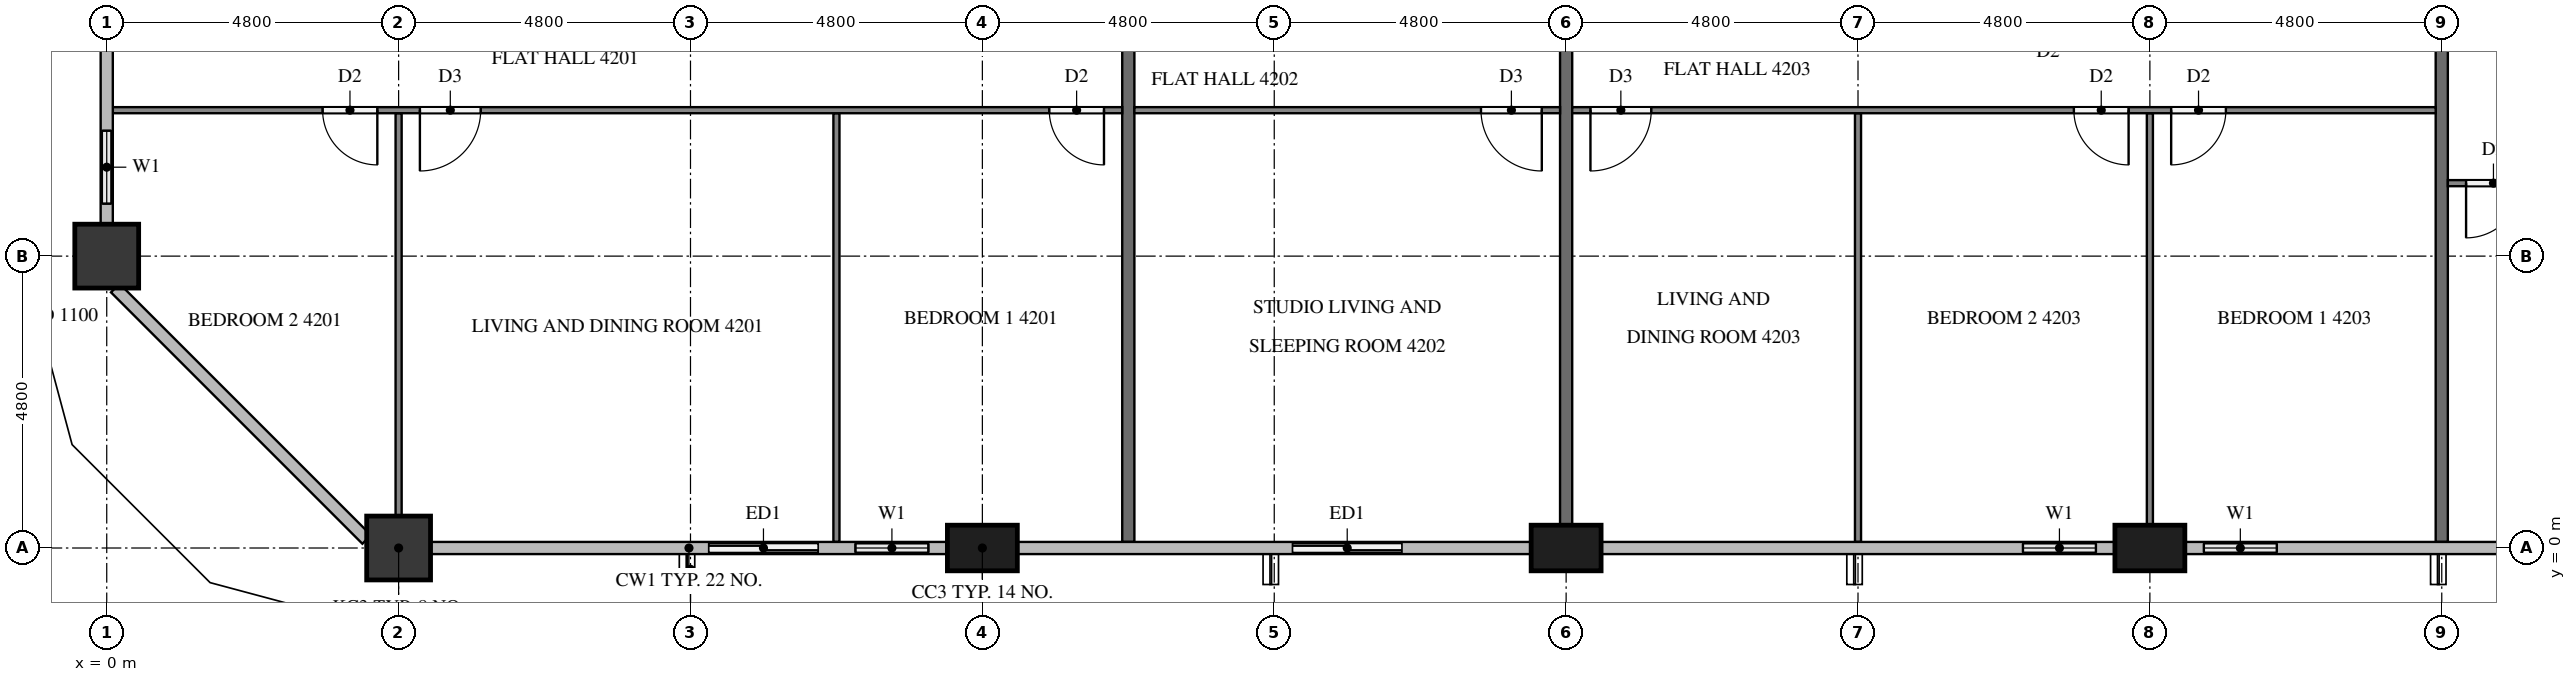
"""IFC4 building model, lengths in metres.
Left out: names, types, materials, properties, quantities, classifications, styles, units other than length and angle.
Written with IfcOpenShell. Run it as: python <this file> out.ifc"""

import sys

from ifc_helpers import new_model, si_unit, direction, frame, frame_2d, origin, origin_2d, place, context, subcontext, project, spatial, rectangle, extrude, element, fill, save


model = new_model("IFC4")
c1 = context("Model", 3, precision=1e-05, world=origin(), true_north=direction((0.0, 1.0)))
c2 = subcontext(c1, "Body", "Model", "MODEL_VIEW")
j1 = project(units=[si_unit("LENGTHUNIT", "METRE"), si_unit("PLANEANGLEUNIT", "RADIAN")], contexts=[c1])
p1 = place(None, origin())
s1 = spatial("IfcSite", under=j1, at=p1, CompositionType="ELEMENT")
p2 = place(p1, origin())
s2 = spatial("IfcBuilding", under=s1, at=p2, CompositionType="ELEMENT")
p3 = place(p2, frame((0.0, 0.0, 163.0)))
s3 = spatial("IfcBuildingStorey", under=s2, at=p3, CompositionType="ELEMENT", Elevation=163.0)
p4 = place(p3, frame((4.8, 0.0, 0.0), z_axis=(0.0, 0.0, 1.0), x_axis=(1.0, 0.0, 0.0)))
e1 = element("IfcColumn", 1, at=p4, inside=s3, PredefinedType="COLUMN", context=c2, shape_type="SweptSolid", body=[
    extrude(rectangle(XDim=1.05, YDim=1.05, at=origin_2d()), origin(), (0.0, 0.0, 1.0), 3.2),
])
for number, where, z_axis, x_axis in (
    (2, (14.4, 0.0, 0.0), (0.0, 0.0, 1.0), (1.0, 0.0, 0.0)),
    (3, (24.0, 0.0, 0.0), (0.0, 0.0, 1.0), (1.0, 0.0, 0.0)),
    (4, (33.6, 0.0, 0.0), (0.0, 0.0, 1.0), (1.0, 0.0, 0.0)),
):
    element("IfcColumn", number, at=place(p3, frame(where, z_axis=z_axis, x_axis=x_axis)), inside=s3, PredefinedType="COLUMN", context=c2, shape_type="SweptSolid", body=[
        extrude(rectangle(XDim=1.15, YDim=0.75, at=origin_2d()), origin(), (0.0, 0.0, 1.0), 3.2),
    ])
p5 = place(p3, frame((0.0, 4.8, 0.0), z_axis=(0.0, 0.0, 1.0), x_axis=(1.0, 0.0, 0.0)))
e5 = element("IfcColumn", 5, at=p5, inside=s3, PredefinedType="COLUMN", context=c2, shape_type="SweptSolid", body=[
    extrude(rectangle(XDim=1.05, YDim=1.05, at=origin_2d()), origin(), (0.0, 0.0, 1.0), 3.2),
])
p6 = place(p3, frame((9.6, 0.0, 0.0), z_axis=(0.0, 0.0, 1.0), x_axis=(1.0, 0.0, 0.0)))
e6 = element("IfcWall", 6, at=p6, inside=s3, PredefinedType="SOLIDWALL", context=c2, shape_type="SweptSolid", body=[
    extrude(rectangle(XDim=4.225, YDim=0.15, at=frame_2d((2.112, 0.0))), origin(), (0.0, 0.0, 1.0), 3.2),
])
p7 = place(p6, frame((0.3, 0.0, 0.0)))
e7 = element("IfcOpeningElement", 7, at=p7, cuts=e6, PredefinedType="OPENING", context=c2, shape_type="SweptSolid", body=[
    extrude(rectangle(XDim=1.8, YDim=2.4, at=frame_2d((0.9, 1.2))), frame((0.0, 0.085, 0.0), z_axis=(0.0, -1.0, 0.0), x_axis=(1.0, 0.0, 0.0)), (0.0, 0.0, 1.0), 0.17),
])
p8 = place(p6, frame((2.712, 0.0, 0.9)))
e8 = element("IfcOpeningElement", 8, at=p8, cuts=e6, PredefinedType="OPENING", context=c2, shape_type="SweptSolid", body=[
    extrude(rectangle(XDim=1.2, YDim=1.4, at=frame_2d((0.6, 0.7))), frame((0.0, 0.085, 0.0), z_axis=(0.0, -1.0, 0.0), x_axis=(1.0, 0.0, 0.0)), (0.0, 0.0, 1.0), 0.17),
])
p9 = place(p3, frame((19.2, 0.0, 0.0), z_axis=(0.0, 0.0, 1.0), x_axis=(1.0, 0.0, 0.0)))
e9 = element("IfcWall", 9, at=p9, inside=s3, PredefinedType="SOLIDWALL", context=c2, shape_type="SweptSolid", body=[
    extrude(rectangle(XDim=2.4, YDim=0.15, at=frame_2d((1.2, 0.0))), origin(), (0.0, 0.0, 1.0), 3.2),
])
p10 = place(p9, frame((0.3, 0.0, 0.0)))
e10 = element("IfcOpeningElement", 10, at=p10, cuts=e9, PredefinedType="OPENING", context=c2, shape_type="SweptSolid", body=[
    extrude(rectangle(XDim=1.8, YDim=2.4, at=frame_2d((0.9, 1.2))), frame((0.0, 0.085, 0.0), z_axis=(0.0, -1.0, 0.0), x_axis=(1.0, 0.0, 0.0)), (0.0, 0.0, 1.0), 0.17),
])
p11 = place(p3, frame((31.2, 0.0, 0.0), z_axis=(0.0, 0.0, 1.0), x_axis=(1.0, 0.0, 0.0)))
e11 = element("IfcWall", 11, at=p11, inside=s3, PredefinedType="SOLIDWALL", context=c2, shape_type="SweptSolid", body=[
    extrude(rectangle(XDim=1.825, YDim=0.15, at=frame_2d((0.913, 0.0))), origin(), (0.0, 0.0, 1.0), 3.2),
])
p12 = place(p11, frame((0.312, 0.0, 0.9)))
e12 = element("IfcOpeningElement", 12, at=p12, cuts=e11, PredefinedType="OPENING", context=c2, shape_type="SweptSolid", body=[
    extrude(rectangle(XDim=1.2, YDim=1.4, at=frame_2d((0.6, 0.7))), frame((0.0, 0.085, 0.0), z_axis=(0.0, -1.0, 0.0), x_axis=(1.0, 0.0, 0.0)), (0.0, 0.0, 1.0), 0.17),
])
p13 = place(p3, frame((34.175, 0.0, 0.0), z_axis=(0.0, 0.0, 1.0), x_axis=(1.0, 0.0, 0.0)))
e13 = element("IfcWall", 13, at=p13, inside=s3, PredefinedType="SOLIDWALL", context=c2, shape_type="SweptSolid", body=[
    extrude(rectangle(XDim=1.825, YDim=0.15, at=frame_2d((0.913, 0.0))), origin(), (0.0, 0.0, 1.0), 3.2),
])
p14 = place(p13, frame((0.312, 0.0, 0.9)))
e14 = element("IfcOpeningElement", 14, at=p14, cuts=e13, PredefinedType="OPENING", context=c2, shape_type="SweptSolid", body=[
    extrude(rectangle(XDim=1.2, YDim=1.4, at=frame_2d((0.6, 0.7))), frame((0.0, 0.085, 0.0), z_axis=(0.0, -1.0, 0.0), x_axis=(1.0, 0.0, 0.0)), (0.0, 0.0, 1.0), 0.17),
])
p15 = place(p3, frame((0.0, 7.2, 0.0), z_axis=(0.0, 0.0, 1.0), x_axis=(0.0, -1.0, 0.0)))
e15 = element("IfcWall", 15, at=p15, inside=s3, PredefinedType="SOLIDWALL", context=c2, shape_type="SweptSolid", body=[
    extrude(rectangle(XDim=1.875, YDim=0.15, at=frame_2d((0.938, 0.0))), origin(), (0.0, 0.0, 1.0), 3.2),
])
p16 = place(p15, frame((0.337, 0.0, 0.9)))
e16 = element("IfcOpeningElement", 16, at=p16, cuts=e15, PredefinedType="OPENING", context=c2, shape_type="SweptSolid", body=[
    extrude(rectangle(XDim=1.2, YDim=1.4, at=frame_2d((0.6, 0.7))), frame((0.0, 0.085, 0.0), z_axis=(0.0, -1.0, 0.0), x_axis=(1.0, 0.0, 0.0)), (0.0, 0.0, 1.0), 0.17),
])
p17 = place(p3, frame((16.8, 11.9, 0.0), z_axis=(0.0, 0.0, 1.0), x_axis=(0.0, -1.0, 0.0)))
e17 = element("IfcWall", 17, at=p17, inside=s3, PredefinedType="PARTITIONING", context=c2, shape_type="SweptSolid", body=[
    extrude(rectangle(XDim=11.8, YDim=0.2, at=frame_2d((5.9, 0.0))), origin(), (0.0, 0.0, 1.0), 3.2),
])
p18 = place(p3, frame((24.0, 11.9, 0.0), z_axis=(0.0, 0.0, 1.0), x_axis=(0.0, -1.0, 0.0)))
e18 = element("IfcWall", 18, at=p18, inside=s3, PredefinedType="PARTITIONING", context=c2, shape_type="SweptSolid", body=[
    extrude(rectangle(XDim=11.525, YDim=0.2, at=frame_2d((5.762, 0.0))), origin(), (0.0, 0.0, 1.0), 3.2),
])
p19 = place(p3, frame((38.4, 11.9, 0.0), z_axis=(0.0, 0.0, 1.0), x_axis=(0.0, -1.0, 0.0)))
e19 = element("IfcWall", 19, at=p19, inside=s3, PredefinedType="PARTITIONING", context=c2, shape_type="SweptSolid", body=[
    extrude(rectangle(XDim=11.8, YDim=0.2, at=frame_2d((5.9, 0.0))), origin(), (0.0, 0.0, 1.0), 3.2),
])
p20 = place(p3, frame((12.0, 7.15, 0.0), z_axis=(0.0, 0.0, 1.0), x_axis=(0.0, -1.0, 0.0)))
e20 = element("IfcWall", 20, at=p20, inside=s3, PredefinedType="PARTITIONING", context=c2, shape_type="SweptSolid", body=[
    extrude(rectangle(XDim=7.05, YDim=0.1, at=frame_2d((3.525, 0.0))), origin(), (0.0, 0.0, 1.0), 3.2),
])
p21 = place(p3, frame((4.8, 7.15, 0.0), z_axis=(0.0, 0.0, 1.0), x_axis=(0.0, -1.0, 0.0)))
e21 = element("IfcWall", 21, at=p21, inside=s3, PredefinedType="PARTITIONING", context=c2, shape_type="SweptSolid", body=[
    extrude(rectangle(XDim=6.625, YDim=0.1, at=frame_2d((3.312, 0.0))), origin(), (0.0, 0.0, 1.0), 3.2),
])
p22 = place(p3, frame((16.7, 7.2, 0.0), z_axis=(0.0, 0.0, 1.0), x_axis=(-1.0, 0.0, 0.0)))
e22 = element("IfcWall", 22, at=p22, inside=s3, PredefinedType="PARTITIONING", context=c2, shape_type="SweptSolid", body=[
    extrude(rectangle(XDim=16.6, YDim=0.1, at=frame_2d((8.3, 0.0))), origin(), (0.0, 0.0, 1.0), 3.2),
])
p23 = place(p22, frame((0.3, 0.0, 0.0)))
e23 = element("IfcOpeningElement", 23, at=p23, cuts=e22, PredefinedType="OPENING", context=c2, shape_type="SweptSolid", body=[
    extrude(rectangle(XDim=0.9, YDim=2.1, at=frame_2d((0.45, 1.05))), frame((0.0, 0.06, 0.0), z_axis=(0.0, -1.0, 0.0), x_axis=(1.0, 0.0, 0.0)), (0.0, 0.0, 1.0), 0.12),
])
p24 = place(p22, frame((10.55, 0.0, 0.0)))
e24 = element("IfcOpeningElement", 24, at=p24, cuts=e22, PredefinedType="OPENING", context=c2, shape_type="SweptSolid", body=[
    extrude(rectangle(XDim=1.0, YDim=2.1, at=frame_2d((0.5, 1.05))), frame((0.0, 0.06, 0.0), z_axis=(0.0, -1.0, 0.0), x_axis=(1.0, 0.0, 0.0)), (0.0, 0.0, 1.0), 0.12),
])
p25 = place(p22, frame((12.25, 0.0, 0.0)))
e25 = element("IfcOpeningElement", 25, at=p25, cuts=e22, PredefinedType="OPENING", context=c2, shape_type="SweptSolid", body=[
    extrude(rectangle(XDim=0.9, YDim=2.1, at=frame_2d((0.45, 1.05))), frame((0.0, 0.06, 0.0), z_axis=(0.0, -1.0, 0.0), x_axis=(1.0, 0.0, 0.0)), (0.0, 0.0, 1.0), 0.12),
])
p26 = place(p3, frame((23.9, 7.2, 0.0), z_axis=(0.0, 0.0, 1.0), x_axis=(-1.0, 0.0, 0.0)))
e26 = element("IfcWall", 26, at=p26, inside=s3, PredefinedType="PARTITIONING", context=c2, shape_type="SweptSolid", body=[
    extrude(rectangle(XDim=7.0, YDim=0.1, at=frame_2d((3.5, 0.0))), origin(), (0.0, 0.0, 1.0), 3.2),
])
p27 = place(p26, frame((0.3, 0.0, 0.0)))
e27 = element("IfcOpeningElement", 27, at=p27, cuts=e26, PredefinedType="OPENING", context=c2, shape_type="SweptSolid", body=[
    extrude(rectangle(XDim=1.0, YDim=2.1, at=frame_2d((0.5, 1.05))), frame((0.0, 0.06, 0.0), z_axis=(0.0, -1.0, 0.0), x_axis=(1.0, 0.0, 0.0)), (0.0, 0.0, 1.0), 0.12),
])
p28 = place(p3, frame((33.6, 7.15, 0.0), z_axis=(0.0, 0.0, 1.0), x_axis=(0.0, -1.0, 0.0)))
e28 = element("IfcWall", 28, at=p28, inside=s3, PredefinedType="PARTITIONING", context=c2, shape_type="SweptSolid", body=[
    extrude(rectangle(XDim=6.775, YDim=0.1, at=frame_2d((3.387, 0.0))), origin(), (0.0, 0.0, 1.0), 3.2),
])
p29 = place(p3, frame((28.8, 7.15, 0.0), z_axis=(0.0, 0.0, 1.0), x_axis=(0.0, -1.0, 0.0)))
e29 = element("IfcWall", 29, at=p29, inside=s3, PredefinedType="PARTITIONING", context=c2, shape_type="SweptSolid", body=[
    extrude(rectangle(XDim=7.05, YDim=0.1, at=frame_2d((3.525, 0.0))), origin(), (0.0, 0.0, 1.0), 3.2),
])
p30 = place(p3, frame((38.3, 7.2, 0.0), z_axis=(0.0, 0.0, 1.0), x_axis=(-1.0, 0.0, 0.0)))
e30 = element("IfcWall", 30, at=p30, inside=s3, PredefinedType="PARTITIONING", context=c2, shape_type="SweptSolid", body=[
    extrude(rectangle(XDim=14.2, YDim=0.1, at=frame_2d((7.1, 0.0))), origin(), (0.0, 0.0, 1.0), 3.2),
])
p31 = place(p30, frame((3.45, 0.0, 0.0)))
e31 = element("IfcOpeningElement", 31, at=p31, cuts=e30, PredefinedType="OPENING", context=c2, shape_type="SweptSolid", body=[
    extrude(rectangle(XDim=0.9, YDim=2.1, at=frame_2d((0.45, 1.05))), frame((0.0, 0.06, 0.0), z_axis=(0.0, -1.0, 0.0), x_axis=(1.0, 0.0, 0.0)), (0.0, 0.0, 1.0), 0.12),
])
p32 = place(p30, frame((5.05, 0.0, 0.0)))
e32 = element("IfcOpeningElement", 32, at=p32, cuts=e30, PredefinedType="OPENING", context=c2, shape_type="SweptSolid", body=[
    extrude(rectangle(XDim=0.9, YDim=2.1, at=frame_2d((0.45, 1.05))), frame((0.0, 0.06, 0.0), z_axis=(0.0, -1.0, 0.0), x_axis=(1.0, 0.0, 0.0)), (0.0, 0.0, 1.0), 0.12),
])
p33 = place(p30, frame((12.9, 0.0, 0.0)))
e33 = element("IfcOpeningElement", 33, at=p33, cuts=e30, PredefinedType="OPENING", context=c2, shape_type="SweptSolid", body=[
    extrude(rectangle(XDim=1.0, YDim=2.1, at=frame_2d((0.5, 1.05))), frame((0.0, 0.06, 0.0), z_axis=(0.0, -1.0, 0.0), x_axis=(1.0, 0.0, 0.0)), (0.0, 0.0, 1.0), 0.12),
])
p34 = place(p3, frame((57.5, 6.0, 0.0), z_axis=(0.0, 0.0, 1.0), x_axis=(-1.0, 0.0, 0.0)))
e34 = element("IfcWall", 34, at=p34, inside=s3, PredefinedType="PARTITIONING", context=c2, shape_type="SweptSolid", body=[
    extrude(rectangle(XDim=19.0, YDim=0.1, at=frame_2d((9.5, 0.0))), origin(), (0.0, 0.0, 1.0), 3.2),
])
p35 = place(p34, frame((17.8, 0.0, 0.0)))
e35 = element("IfcOpeningElement", 35, at=p35, cuts=e34, PredefinedType="OPENING", context=c2, shape_type="SweptSolid", body=[
    extrude(rectangle(XDim=0.9, YDim=2.1, at=frame_2d((0.45, 1.05))), frame((0.0, 0.06, 0.0), z_axis=(0.0, -1.0, 0.0), x_axis=(1.0, 0.0, 0.0)), (0.0, 0.0, 1.0), 0.12),
])
p36 = place(p34, frame((9.85, 0.0, 0.0)))
e36 = element("IfcOpeningElement", 36, at=p36, cuts=e34, PredefinedType="OPENING", context=c2, shape_type="SweptSolid", body=[
    extrude(rectangle(XDim=1.0, YDim=2.1, at=frame_2d((0.5, 1.05))), frame((0.0, 0.06, 0.0), z_axis=(0.0, -1.0, 0.0), x_axis=(1.0, 0.0, 0.0)), (0.0, 0.0, 1.0), 0.12),
])
p37 = place(p34, frame((8.25, 0.0, 0.0)))
e37 = element("IfcOpeningElement", 37, at=p37, cuts=e34, PredefinedType="OPENING", context=c2, shape_type="SweptSolid", body=[
    extrude(rectangle(XDim=0.9, YDim=2.1, at=frame_2d((0.45, 1.05))), frame((0.0, 0.06, 0.0), z_axis=(0.0, -1.0, 0.0), x_axis=(1.0, 0.0, 0.0)), (0.0, 0.0, 1.0), 0.12),
])
p38 = place(p34, frame((0.5, 0.0, 0.0)))
e38 = element("IfcOpeningElement", 38, at=p38, cuts=e34, PredefinedType="OPENING", context=c2, shape_type="SweptSolid", body=[
    extrude(rectangle(XDim=0.9, YDim=2.1, at=frame_2d((0.45, 1.05))), frame((0.0, 0.06, 0.0), z_axis=(0.0, -1.0, 0.0), x_axis=(1.0, 0.0, 0.0)), (0.0, 0.0, 1.0), 0.12),
])
p39 = place(p7, origin())
e39 = element("IfcDoor", 39, at=p39, inside=s3, OperationType="SLIDING_TO_LEFT", PredefinedType="DOOR", context=c2, shape_type="SweptSolid", body=[
    extrude(rectangle(XDim=1.8, YDim=2.4, at=frame_2d((0.9, 1.2))), frame((0.0, 0.025, 0.0), z_axis=(0.0, -1.0, 0.0), x_axis=(1.0, 0.0, 0.0)), (0.0, 0.0, 1.0), 0.05),
])
fill(e7, e39)
p40 = place(p8, origin())
e40 = element("IfcWindow", 40, at=p40, inside=s3, PartitioningType="SINGLE_PANEL", PredefinedType="WINDOW", context=c2, shape_type="SweptSolid", body=[
    extrude(rectangle(XDim=1.2, YDim=1.4, at=frame_2d((0.6, 0.7))), frame((0.0, 0.03, 0.0), z_axis=(0.0, -1.0, 0.0), x_axis=(1.0, 0.0, 0.0)), (0.0, 0.0, 1.0), 0.06),
])
fill(e8, e40)
p41 = place(p10, origin())
e41 = element("IfcDoor", 41, at=p41, inside=s3, OperationType="SLIDING_TO_RIGHT", PredefinedType="DOOR", context=c2, shape_type="SweptSolid", body=[
    extrude(rectangle(XDim=1.8, YDim=2.4, at=frame_2d((0.9, 1.2))), frame((0.0, 0.025, 0.0), z_axis=(0.0, -1.0, 0.0), x_axis=(1.0, 0.0, 0.0)), (0.0, 0.0, 1.0), 0.05),
])
fill(e10, e41)
p42 = place(p12, origin())
e42 = element("IfcWindow", 42, at=p42, inside=s3, PartitioningType="SINGLE_PANEL", PredefinedType="WINDOW", context=c2, shape_type="SweptSolid", body=[
    extrude(rectangle(XDim=1.2, YDim=1.4, at=frame_2d((0.6, 0.7))), frame((0.0, 0.03, 0.0), z_axis=(0.0, -1.0, 0.0), x_axis=(1.0, 0.0, 0.0)), (0.0, 0.0, 1.0), 0.06),
])
fill(e12, e42)
p43 = place(p14, origin())
e43 = element("IfcWindow", 43, at=p43, inside=s3, PartitioningType="SINGLE_PANEL", PredefinedType="WINDOW", context=c2, shape_type="SweptSolid", body=[
    extrude(rectangle(XDim=1.2, YDim=1.4, at=frame_2d((0.6, 0.7))), frame((0.0, 0.03, 0.0), z_axis=(0.0, -1.0, 0.0), x_axis=(1.0, 0.0, 0.0)), (0.0, 0.0, 1.0), 0.06),
])
fill(e14, e43)
p44 = place(p16, origin())
e44 = element("IfcWindow", 44, at=p44, inside=s3, PartitioningType="SINGLE_PANEL", PredefinedType="WINDOW", context=c2, shape_type="SweptSolid", body=[
    extrude(rectangle(XDim=1.2, YDim=1.4, at=frame_2d((0.6, 0.7))), frame((0.0, 0.03, 0.0), z_axis=(0.0, -1.0, 0.0), x_axis=(1.0, 0.0, 0.0)), (0.0, 0.0, 1.0), 0.06),
])
fill(e16, e44)
p45 = place(p23, origin())
e45 = element("IfcDoor", 45, at=p45, inside=s3, OperationType="SINGLE_SWING_LEFT", PredefinedType="DOOR", context=c2, shape_type="SweptSolid", body=[
    extrude(rectangle(XDim=0.9, YDim=2.1, at=frame_2d((0.45, 1.05))), frame((0.0, 0.025, 0.0), z_axis=(0.0, -1.0, 0.0), x_axis=(1.0, 0.0, 0.0)), (0.0, 0.0, 1.0), 0.05),
])
fill(e23, e45)
p46 = place(p24, origin())
e46 = element("IfcDoor", 46, at=p46, inside=s3, OperationType="SINGLE_SWING_RIGHT", PredefinedType="DOOR", context=c2, shape_type="SweptSolid", body=[
    extrude(rectangle(XDim=1.0, YDim=2.1, at=frame_2d((0.5, 1.05))), frame((0.0, 0.025, 0.0), z_axis=(0.0, -1.0, 0.0), x_axis=(1.0, 0.0, 0.0)), (0.0, 0.0, 1.0), 0.05),
])
fill(e24, e46)
p47 = place(p25, origin())
e47 = element("IfcDoor", 47, at=p47, inside=s3, OperationType="SINGLE_SWING_LEFT", PredefinedType="DOOR", context=c2, shape_type="SweptSolid", body=[
    extrude(rectangle(XDim=0.9, YDim=2.1, at=frame_2d((0.45, 1.05))), frame((0.0, 0.025, 0.0), z_axis=(0.0, -1.0, 0.0), x_axis=(1.0, 0.0, 0.0)), (0.0, 0.0, 1.0), 0.05),
])
fill(e25, e47)
p48 = place(p27, origin())
e48 = element("IfcDoor", 48, at=p48, inside=s3, OperationType="SINGLE_SWING_LEFT", PredefinedType="DOOR", context=c2, shape_type="SweptSolid", body=[
    extrude(rectangle(XDim=1.0, YDim=2.1, at=frame_2d((0.5, 1.05))), frame((0.0, 0.025, 0.0), z_axis=(0.0, -1.0, 0.0), x_axis=(1.0, 0.0, 0.0)), (0.0, 0.0, 1.0), 0.05),
])
fill(e27, e48)
p49 = place(p31, origin())
e49 = element("IfcDoor", 49, at=p49, inside=s3, OperationType="SINGLE_SWING_RIGHT", PredefinedType="DOOR", context=c2, shape_type="SweptSolid", body=[
    extrude(rectangle(XDim=0.9, YDim=2.1, at=frame_2d((0.45, 1.05))), frame((0.0, 0.025, 0.0), z_axis=(0.0, -1.0, 0.0), x_axis=(1.0, 0.0, 0.0)), (0.0, 0.0, 1.0), 0.05),
])
fill(e31, e49)
p50 = place(p32, origin())
e50 = element("IfcDoor", 50, at=p50, inside=s3, OperationType="SINGLE_SWING_LEFT", PredefinedType="DOOR", context=c2, shape_type="SweptSolid", body=[
    extrude(rectangle(XDim=0.9, YDim=2.1, at=frame_2d((0.45, 1.05))), frame((0.0, 0.025, 0.0), z_axis=(0.0, -1.0, 0.0), x_axis=(1.0, 0.0, 0.0)), (0.0, 0.0, 1.0), 0.05),
])
fill(e32, e50)
p51 = place(p33, origin())
e51 = element("IfcDoor", 51, at=p51, inside=s3, OperationType="SINGLE_SWING_RIGHT", PredefinedType="DOOR", context=c2, shape_type="SweptSolid", body=[
    extrude(rectangle(XDim=1.0, YDim=2.1, at=frame_2d((0.5, 1.05))), frame((0.0, 0.025, 0.0), z_axis=(0.0, -1.0, 0.0), x_axis=(1.0, 0.0, 0.0)), (0.0, 0.0, 1.0), 0.05),
])
fill(e33, e51)
p52 = place(p35, origin())
e52 = element("IfcDoor", 52, at=p52, inside=s3, OperationType="SINGLE_SWING_RIGHT", PredefinedType="DOOR", context=c2, shape_type="SweptSolid", body=[
    extrude(rectangle(XDim=0.9, YDim=2.1, at=frame_2d((0.45, 1.05))), frame((0.0, 0.025, 0.0), z_axis=(0.0, -1.0, 0.0), x_axis=(1.0, 0.0, 0.0)), (0.0, 0.0, 1.0), 0.05),
])
fill(e35, e52)
save(model, sys.argv[1])
